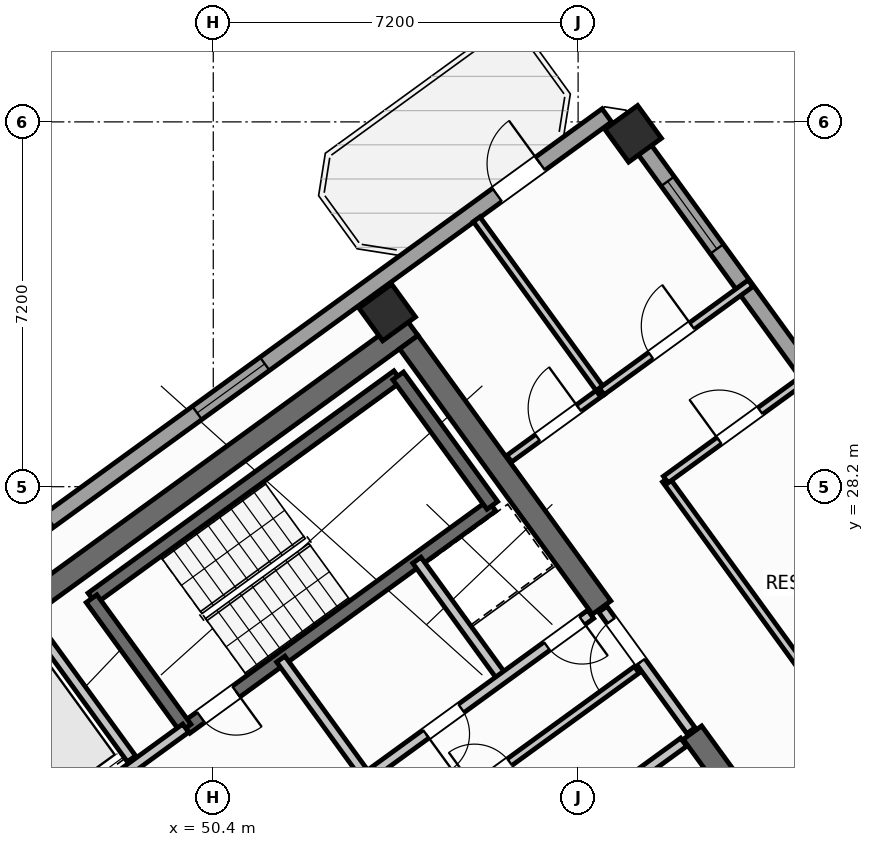
"""IFC4 building model, lengths in metres.
Left out: names, types, materials, properties, quantities, classifications, styles, units other than length and angle.
Written with IfcOpenShell. Run it as: python <this file> out.ifc"""

import sys

from ifc_helpers import new_model, si_unit, direction, frame, frame_2d, origin, origin_2d, place, context, subcontext, project, spatial, rectangle, hollow_rectangle, extrude, source, transform, mapped, element, fill, save


model = new_model("IFC4")
c1 = context("Model", 3, precision=1e-05, world=origin(), true_north=direction((0.0, 1.0)))
c2 = subcontext(c1, "Body", "Model", "MODEL_VIEW")
j1 = project(units=[si_unit("LENGTHUNIT", "METRE"), si_unit("PLANEANGLEUNIT", "RADIAN")], contexts=[c1])
p1 = place(None, origin())
s1 = spatial("IfcSite", under=j1, at=p1, CompositionType="ELEMENT")
p2 = place(p1, origin())
s2 = spatial("IfcBuilding", under=s1, at=p2, CompositionType="ELEMENT")
p3 = place(p2, frame((0.0, 0.0, 238.5)))
s3 = spatial("IfcBuildingStorey", under=s2, at=p3, CompositionType="ELEMENT", Elevation=238.5)
p4 = place(p3, frame((44.406, 24.172, 0.0), z_axis=(0.0, 0.0, 1.0), x_axis=(0.809012867805, 0.587790931986, 0.0)))
e1 = element("IfcWall", 1, at=p4, inside=s3, PredefinedType="SHEAR", context=c2, shape_type="SweptSolid", body=[
    extrude(rectangle(XDim=12.24, YDim=0.45, at=frame_2d((6.12, 0.0))), origin(), (0.0, 0.0, 1.0), 3.35),
])
p5 = place(p3, frame((48.526, 18.884, 0.0), z_axis=(0.0, 0.0, 1.0), x_axis=(-0.587774812919, 0.809024578921, 0.0)))
e2 = element("IfcWall", 2, at=p5, inside=s3, PredefinedType="SHEAR", context=c2, shape_type="SweptSolid", body=[
    extrude(rectangle(XDim=6.475, YDim=0.45, at=frame_2d((3.238, 0.0))), origin(), (0.0, 0.0, 1.0), 3.35),
])
p6 = place(p3, frame((61.988, 20.413, 0.0), z_axis=(0.0, 0.0, 1.0), x_axis=(-0.587819244441, 0.808992296542, 0.0)))
e3 = element("IfcWall", 3, at=p6, inside=s3, PredefinedType="SHEAR", context=c2, shape_type="SweptSolid", body=[
    extrude(rectangle(XDim=3.625, YDim=0.45, at=frame_2d((1.812, 0.0))), origin(), (0.0, 0.0, 1.0), 3.35),
])
p7 = place(p3, frame((58.064, 25.813, 0.0), z_axis=(0.0, 0.0, 1.0), x_axis=(-0.587774812919, 0.809024578921, 0.0)))
e4 = element("IfcWall", 4, at=p7, inside=s3, PredefinedType="SHEAR", context=c2, shape_type="SweptSolid", body=[
    extrude(rectangle(XDim=6.475, YDim=0.45, at=frame_2d((3.238, 0.0))), origin(), (0.0, 0.0, 1.0), 3.35),
])
m1 = source(origin(), c2, "Body", "SweptSolid", [
    extrude(hollow_rectangle(XDim=0.8, YDim=0.8, WallThickness=0.032, at=origin_2d()), origin(), (0.0, 0.0, 1.0), 3.6),
])
for number, where, z_axis, x_axis in (
    (5, (53.832, 31.638, 0.0), (0.0, 0.0, 1.0), (0.809, 0.588, 0.0)),
    (6, (58.686, 35.165, 0.0), (0.0, 0.0, 1.0), (0.809, 0.588, 0.0)),
):
    element("IfcColumn", number, at=place(p3, frame(where, z_axis=z_axis, x_axis=x_axis)), inside=s3, PredefinedType="COLUMN", context=c2, shape_type="MappedRepresentation", body=[
        mapped(m1, transform((0.0, 0.0, 0.0), scale=1.0)),
    ])
p8 = place(p3, frame((43.938, 25.192, 0.0), z_axis=(0.0, 0.0, 1.0), x_axis=(0.809016324578, 0.587786174187, 0.0)))
e7 = element("IfcWall", 7, at=p8, inside=s3, PredefinedType="STANDARD", context=c2, shape_type="SweptSolid", body=[
    extrude(rectangle(XDim=17.587, YDim=0.32, at=frame_2d((8.794, 0.0))), origin(), (0.0, 0.0, 1.0), 3.35),
])
p9 = place(p8, frame((14.914, 0.0, 0.0)))
e8 = element("IfcOpeningElement", 8, at=p9, cuts=e7, PredefinedType="OPENING", context=c2, shape_type="SweptSolid", body=[
    extrude(rectangle(XDim=1.05, YDim=2.15, at=frame_2d((0.525, 1.075))), frame((0.0, 0.17, 0.0), z_axis=(0.0, -1.0, 0.0), x_axis=(1.0, 0.0, 0.0)), (0.0, 0.0, 1.0), 0.34),
])
p10 = place(p8, frame((2.344, 0.0, 0.9)))
e9 = element("IfcOpeningElement", 9, at=p10, cuts=e7, PredefinedType="OPENING", context=c2, shape_type="SweptSolid", body=[
    extrude(rectangle(XDim=1.65, YDim=1.45, at=frame_2d((0.825, 0.725))), frame((0.0, 0.17, 0.0), z_axis=(0.0, -1.0, 0.0), x_axis=(1.0, 0.0, 0.0)), (0.0, 0.0, 1.0), 0.34),
])
p11 = place(p8, frame((7.594, 0.0, 0.9)))
e10 = element("IfcOpeningElement", 10, at=p11, cuts=e7, PredefinedType="OPENING", context=c2, shape_type="SweptSolid", body=[
    extrude(rectangle(XDim=1.65, YDim=1.45, at=frame_2d((0.825, 0.725))), frame((0.0, 0.17, 0.0), z_axis=(0.0, -1.0, 0.0), x_axis=(1.0, 0.0, 0.0)), (0.0, 0.0, 1.0), 0.34),
])
p12 = place(p3, frame((58.455, 35.484, 0.0), z_axis=(0.0, 0.0, 1.0), x_axis=(0.587783625747, -0.809018176127, 0.0)))
e11 = element("IfcWall", 11, at=p12, inside=s3, PredefinedType="STANDARD", context=c2, shape_type="SweptSolid", body=[
    extrude(rectangle(XDim=21.587, YDim=0.32, at=frame_2d((10.794, 0.0))), origin(), (0.0, 0.0, 1.0), 2.875),
])
p13 = place(p12, frame((1.554, 0.0, 0.9)))
e12 = element("IfcOpeningElement", 12, at=p13, cuts=e11, PredefinedType="OPENING", context=c2, shape_type="SweptSolid", body=[
    extrude(rectangle(XDim=1.65, YDim=1.45, at=frame_2d((0.825, 0.725))), frame((0.0, 0.17, 0.0), z_axis=(0.0, -1.0, 0.0), x_axis=(1.0, 0.0, 0.0)), (0.0, 0.0, 1.0), 0.34),
])
p14 = place(p12, frame((9.219, 0.0, 0.9)))
e13 = element("IfcOpeningElement", 13, at=p14, cuts=e11, PredefinedType="OPENING", context=c2, shape_type="SweptSolid", body=[
    extrude(rectangle(XDim=1.35, YDim=1.45, at=frame_2d((0.675, 0.725))), frame((0.0, 0.17, 0.0), z_axis=(0.0, -1.0, 0.0), x_axis=(1.0, 0.0, 0.0)), (0.0, 0.0, 1.0), 0.34),
])
p15 = place(p12, frame((12.119, 0.0, 0.9)))
e14 = element("IfcOpeningElement", 14, at=p15, cuts=e11, PredefinedType="OPENING", context=c2, shape_type="SweptSolid", body=[
    extrude(rectangle(XDim=1.35, YDim=1.45, at=frame_2d((0.675, 0.725))), frame((0.0, 0.17, 0.0), z_axis=(0.0, -1.0, 0.0), x_axis=(1.0, 0.0, 0.0)), (0.0, 0.0, 1.0), 0.34),
])
p16 = place(p12, frame((16.833, 0.0, 1.0)))
e15 = element("IfcOpeningElement", 15, at=p16, cuts=e11, PredefinedType="OPENING", context=c2, shape_type="SweptSolid", body=[
    extrude(rectangle(XDim=0.9, YDim=1.25, at=frame_2d((0.45, 0.625))), frame((0.0, 0.17, 0.0), z_axis=(0.0, -1.0, 0.0), x_axis=(1.0, 0.0, 0.0)), (0.0, 0.0, 1.0), 0.34),
])
p17 = place(p12, frame((19.057, 0.0, 1.0)))
e16 = element("IfcOpeningElement", 16, at=p17, cuts=e11, PredefinedType="OPENING", context=c2, shape_type="SweptSolid", body=[
    extrude(rectangle(XDim=0.9, YDim=1.25, at=frame_2d((0.45, 0.625))), frame((0.0, 0.17, 0.0), z_axis=(0.0, -1.0, 0.0), x_axis=(1.0, 0.0, 0.0)), (0.0, 0.0, 1.0), 0.34),
])
p18 = place(p3, frame((48.006, 25.996, 0.0), z_axis=(0.0, 0.0, 1.0), x_axis=(0.80901903764, 0.587782439969, 0.0)))
e17 = element("IfcWall", 17, at=p18, inside=s3, PredefinedType="SHEAR", context=c2, shape_type="SweptSolid", body=[
    extrude(rectangle(XDim=7.46, YDim=0.26, at=frame_2d((3.73, 0.0))), origin(), (0.0, 0.0, 1.0), 3.35),
])
p19 = place(p3, frame((49.863, 23.44, 0.0), z_axis=(0.0, 0.0, 1.0), x_axis=(0.809003474932, 0.587803859759, 0.0)))
e18 = element("IfcWall", 18, at=p19, inside=s3, PredefinedType="SHEAR", context=c2, shape_type="SweptSolid", body=[
    extrude(rectangle(XDim=7.46, YDim=0.26, at=frame_2d((3.73, 0.0))), origin(), (0.0, 0.0, 1.0), 3.35),
])
p20 = place(p19, frame((0.36, 0.0, 0.0)))
e19 = element("IfcOpeningElement", 19, at=p20, cuts=e18, PredefinedType="OPENING", context=c2, shape_type="SweptSolid", body=[
    extrude(rectangle(XDim=0.86, YDim=2.05, at=frame_2d((0.43, 1.025))), frame((0.0, 0.14, 0.0), z_axis=(0.0, -1.0, 0.0), x_axis=(1.0, 0.0, 0.0)), (0.0, 0.0, 1.0), 0.28),
])
p21 = place(p3, frame((49.855, 23.434, 0.0), z_axis=(0.0, 0.0, 1.0), x_axis=(-0.58776738483, 0.809029975545, 0.0)))
e20 = element("IfcWall", 20, at=p21, inside=s3, PredefinedType="SHEAR", context=c2, shape_type="SweptSolid", body=[
    extrude(rectangle(XDim=3.16, YDim=0.26, at=frame_2d((1.58, 0.0))), origin(), (0.0, 0.0, 1.0), 3.35),
])
p22 = place(p3, frame((55.906, 27.831, 0.0), z_axis=(0.0, 0.0, 1.0), x_axis=(-0.587804123638, 0.809003283204, 0.0)))
e21 = element("IfcWall", 21, at=p22, inside=s3, PredefinedType="SHEAR", context=c2, shape_type="SweptSolid", body=[
    extrude(rectangle(XDim=3.16, YDim=0.26, at=frame_2d((1.58, 0.0))), origin(), (0.0, 0.0, 1.0), 3.35),
])
p23 = place(p3, frame((47.025, 21.378, 0.0), z_axis=(0.0, 0.0, 1.0), x_axis=(0.809052869724, 0.587735870941, 0.0)))
e22 = element("IfcWall", 22, at=p23, inside=s3, PredefinedType="STANDARD", context=c2, shape_type="SweptSolid", body=[
    extrude(rectangle(XDim=3.498, YDim=0.2, at=frame_2d((1.749, 0.0))), origin(), (0.0, 0.0, 1.0), 3.34),
])
p24 = place(p23, frame((0.508, 0.0, 0.0)))
e23 = element("IfcOpeningElement", 23, at=p24, cuts=e22, PredefinedType="OPENING", context=c2, shape_type="SweptSolid", body=[
    extrude(rectangle(XDim=1.3, YDim=2.2, at=frame_2d((0.65, 1.1))), frame((0.0, 0.11, 0.0), z_axis=(0.0, -1.0, 0.0), x_axis=(1.0, 0.0, 0.0)), (0.0, 0.0, 1.0), 0.22),
])
p25 = place(p3, frame((56.553, 20.884, 0.0), z_axis=(0.0, 0.0, 1.0), x_axis=(0.809041669066, 0.587751288995, 0.0)))
e24 = element("IfcWall", 24, at=p25, inside=s3, PredefinedType="STANDARD", context=c2, shape_type="SweptSolid", body=[
    extrude(rectangle(XDim=3.868, YDim=0.2, at=frame_2d((1.934, 0.0))), origin(), (0.0, 0.0, 1.0), 3.34),
])
p26 = place(p25, frame((0.55, 0.0, 0.0)))
e25 = element("IfcOpeningElement", 25, at=p26, cuts=e24, PredefinedType="OPENING", context=c2, shape_type="SweptSolid", body=[
    extrude(rectangle(XDim=0.86, YDim=2.05, at=frame_2d((0.43, 1.025))), frame((0.0, 0.11, 0.0), z_axis=(0.0, -1.0, 0.0), x_axis=(1.0, 0.0, 0.0)), (0.0, 0.0, 1.0), 0.22),
])
p27 = place(p3, frame((54.421, 21.436, 0.0), z_axis=(0.0, 0.0, 1.0), x_axis=(0.809013710463, 0.587789772183, 0.0)))
e26 = element("IfcWall", 26, at=p27, inside=s3, PredefinedType="PARTITIONING", context=c2, shape_type="SweptSolid", body=[
    extrude(rectangle(XDim=5.36, YDim=0.16, at=frame_2d((2.68, 0.0))), origin(), (0.0, 0.0, 1.0), 3.34),
])
p28 = place(p27, frame((1.4, 0.0, 0.0)))
e27 = element("IfcOpeningElement", 27, at=p28, cuts=e26, PredefinedType="OPENING", context=c2, shape_type="SweptSolid", body=[
    extrude(rectangle(XDim=0.86, YDim=2.05, at=frame_2d((0.43, 1.025))), frame((0.0, 0.09, 0.0), z_axis=(0.0, -1.0, 0.0), x_axis=(1.0, 0.0, 0.0)), (0.0, 0.0, 1.0), 0.18),
])
p29 = place(p3, frame((48.786, 22.83, 0.0), z_axis=(0.0, 0.0, 1.0), x_axis=(-0.587783856777, 0.809018008275, 0.0)))
e28 = element("IfcWall", 28, at=p29, inside=s3, PredefinedType="STANDARD", context=c2, shape_type="SweptSolid", body=[
    extrude(rectangle(XDim=2.92, YDim=0.2, at=frame_2d((1.46, 0.0))), origin(), (0.0, 0.0, 1.0), 3.34),
])
p30 = place(p3, frame((53.425, 22.468, 0.0), z_axis=(0.0, 0.0, 1.0), x_axis=(-0.5877230039, 0.809062216821, 0.0)))
e29 = element("IfcWall", 29, at=p30, inside=s3, PredefinedType="STANDARD", context=c2, shape_type="SweptSolid", body=[
    extrude(rectangle(XDim=2.88, YDim=0.2, at=frame_2d((1.44, 0.0))), origin(), (0.0, 0.0, 1.0), 3.34),
])
p31 = place(p3, frame((56.111, 24.419, 0.0), z_axis=(0.0, 0.0, 1.0), x_axis=(-0.58777848983, 0.809021907548, 0.0)))
e30 = element("IfcWall", 30, at=p31, inside=s3, PredefinedType="STANDARD", context=c2, shape_type="SweptSolid", body=[
    extrude(rectangle(XDim=2.88, YDim=0.2, at=frame_2d((1.44, 0.0))), origin(), (0.0, 0.0, 1.0), 3.34),
])
p32 = place(p3, frame((53.425, 22.468, 0.0), z_axis=(0.0, 0.0, 1.0), x_axis=(0.809015945709, 0.587786695655, 0.0)))
e31 = element("IfcWall", 31, at=p32, inside=s3, PredefinedType="STANDARD", context=c2, shape_type="SweptSolid", body=[
    extrude(rectangle(XDim=5.468, YDim=0.2, at=frame_2d((2.734, 0.0))), origin(), (0.0, 0.0, 1.0), 3.34),
])
p33 = place(p32, frame((4.4, 0.0, 0.0)))
e32 = element("IfcOpeningElement", 32, at=p33, cuts=e31, PredefinedType="OPENING", context=c2, shape_type="SweptSolid", body=[
    extrude(rectangle(XDim=0.86, YDim=2.05, at=frame_2d((0.43, 1.025))), frame((0.0, 0.11, 0.0), z_axis=(0.0, -1.0, 0.0), x_axis=(1.0, 0.0, 0.0)), (0.0, 0.0, 1.0), 0.22),
])
p34 = place(p32, frame((1.45, 0.0, 0.0)))
e33 = element("IfcOpeningElement", 33, at=p34, cuts=e31, PredefinedType="OPENING", context=c2, shape_type="SweptSolid", body=[
    extrude(rectangle(XDim=0.86, YDim=2.05, at=frame_2d((0.43, 1.025))), frame((0.0, 0.11, 0.0), z_axis=(0.0, -1.0, 0.0), x_axis=(1.0, 0.0, 0.0)), (0.0, 0.0, 1.0), 0.22),
])
p35 = place(p3, frame((59.827, 23.386, 0.0), z_axis=(0.0, 0.0, 1.0), x_axis=(-0.587803840107, 0.809003489211, 0.0)))
e34 = element("IfcWall", 34, at=p35, inside=s3, PredefinedType="STANDARD", context=c2, shape_type="SweptSolid", body=[
    extrude(rectangle(XDim=2.96, YDim=0.2, at=frame_2d((1.48, 0.0))), origin(), (0.0, 0.0, 1.0), 3.34),
])
p36 = place(p35, frame((1.68, 0.0, 0.0)))
e35 = element("IfcOpeningElement", 35, at=p36, cuts=e34, PredefinedType="OPENING", context=c2, shape_type="SweptSolid", body=[
    extrude(rectangle(XDim=1.0, YDim=2.1, at=frame_2d((0.5, 1.05))), frame((0.0, 0.11, 0.0), z_axis=(0.0, -1.0, 0.0), x_axis=(1.0, 0.0, 0.0)), (0.0, 0.0, 1.0), 0.22),
])
p37 = place(p3, frame((56.24, 28.753, 0.0), z_axis=(0.0, 0.0, 1.0), x_axis=(0.809002482896, 0.587805225111, 0.0)))
e36 = element("IfcWall", 36, at=p37, inside=s3, PredefinedType="PARTITIONING", context=c2, shape_type="SweptSolid", body=[
    extrude(rectangle(XDim=2.258, YDim=0.16, at=frame_2d((1.129, 0.0))), origin(), (0.0, 0.0, 1.0), 3.34),
])
p38 = place(p37, frame((0.698, 0.0, 0.0)))
e37 = element("IfcOpeningElement", 37, at=p38, cuts=e36, PredefinedType="OPENING", context=c2, shape_type="SweptSolid", body=[
    extrude(rectangle(XDim=1.0, YDim=2.1, at=frame_2d((0.5, 1.05))), frame((0.0, 0.09, 0.0), z_axis=(0.0, -1.0, 0.0), x_axis=(1.0, 0.0, 0.0)), (0.0, 0.0, 1.0), 0.18),
])
p39 = place(p3, frame((68.353, 15.922, 0.0), z_axis=(0.0, 0.0, 1.0), x_axis=(-0.587782002009, 0.809019355834, 0.0)))
e38 = element("IfcWall", 38, at=p39, inside=s3, PredefinedType="PARTITIONING", context=c2, shape_type="SweptSolid", body=[
    extrude(rectangle(XDim=15.35, YDim=0.16, at=frame_2d((7.675, 0.0))), origin(), (0.0, 0.0, 1.0), 3.34),
])
p40 = place(p3, frame((58.067, 30.08, 0.0), z_axis=(0.0, 0.0, 1.0), x_axis=(-0.587812175236, 0.808997433027, 0.0)))
e39 = element("IfcWall", 39, at=p40, inside=s3, PredefinedType="PARTITIONING", context=c2, shape_type="SweptSolid", body=[
    extrude(rectangle(XDim=4.2, YDim=0.16, at=frame_2d((2.1, 0.0))), origin(), (0.0, 0.0, 1.0), 3.34),
])
p41 = place(p3, frame((59.331, 28.341, 0.0), z_axis=(0.0, 0.0, 1.0), x_axis=(0.809003564202, 0.587803736896, 0.0)))
e40 = element("IfcWall", 40, at=p41, inside=s3, PredefinedType="PARTITIONING", context=c2, shape_type="SweptSolid", body=[
    extrude(rectangle(XDim=3.63, YDim=0.16, at=frame_2d((1.815, 0.0))), origin(), (0.0, 0.0, 1.0), 3.34),
])
p42 = place(p41, frame((1.305, 0.0, 0.0)))
e41 = element("IfcOpeningElement", 41, at=p42, cuts=e40, PredefinedType="OPENING", context=c2, shape_type="SweptSolid", body=[
    extrude(rectangle(XDim=1.0, YDim=2.1, at=frame_2d((0.5, 1.05))), frame((0.0, 0.09, 0.0), z_axis=(0.0, -1.0, 0.0), x_axis=(1.0, 0.0, 0.0)), (0.0, 0.0, 1.0), 0.18),
])
p43 = place(p3, frame((58.067, 30.08, 0.0), z_axis=(0.0, 0.0, 1.0), x_axis=(0.809012309495, 0.587791700422, 0.0)))
e42 = element("IfcWall", 42, at=p43, inside=s3, PredefinedType="PARTITIONING", context=c2, shape_type="SweptSolid", body=[
    extrude(rectangle(XDim=3.63, YDim=0.16, at=frame_2d((1.815, 0.0))), origin(), (0.0, 0.0, 1.0), 3.34),
])
p44 = place(p43, frame((1.2, 0.0, 0.0)))
e43 = element("IfcOpeningElement", 43, at=p44, cuts=e42, PredefinedType="OPENING", context=c2, shape_type="SweptSolid", body=[
    extrude(rectangle(XDim=1.0, YDim=2.1, at=frame_2d((0.5, 1.05))), frame((0.0, 0.09, 0.0), z_axis=(0.0, -1.0, 0.0), x_axis=(1.0, 0.0, 0.0)), (0.0, 0.0, 1.0), 0.18),
])
m2 = source(origin(), c2, "Body", "SweptSolid", [
    extrude(rectangle(XDim=1.05, YDim=2.15, at=frame_2d((0.525, 1.075))), frame((0.0, 0.025, 0.0), z_axis=(0.0, -1.0, 0.0), x_axis=(1.0, 0.0, 0.0)), (0.0, 0.0, 1.0), 0.05),
])
p45 = place(p9, origin())
e44 = element("IfcDoor", 44, at=p45, inside=s3, OperationType="SINGLE_SWING_RIGHT", PredefinedType="DOOR", context=c2, shape_type="MappedRepresentation", body=[
    mapped(m2, transform((0.0, 0.0, 0.0), scale=1.0)),
])
fill(e8, e44)
m3 = source(origin(), c2, "Body", "SweptSolid", [
    extrude(rectangle(XDim=1.65, YDim=1.45, at=frame_2d((0.825, 0.725))), frame((0.0, 0.03, 0.0), z_axis=(0.0, -1.0, 0.0), x_axis=(1.0, 0.0, 0.0)), (0.0, 0.0, 1.0), 0.06),
])
p46 = place(p11, origin())
e45 = element("IfcWindow", 45, at=p46, inside=s3, PartitioningType="SINGLE_PANEL", PredefinedType="WINDOW", context=c2, shape_type="MappedRepresentation", body=[
    mapped(m3, transform((0.0, 0.0, 0.0), scale=1.0)),
])
fill(e10, e45)
p47 = place(p13, origin())
e46 = element("IfcWindow", 46, at=p47, inside=s3, PartitioningType="SINGLE_PANEL", PredefinedType="WINDOW", context=c2, shape_type="MappedRepresentation", body=[
    mapped(m3, transform((0.0, 0.0, 0.0), scale=1.0)),
])
fill(e12, e46)
m4 = source(origin(), c2, "Body", "SweptSolid", [
    extrude(rectangle(XDim=0.86, YDim=2.05, at=frame_2d((0.43, 1.025))), frame((0.0, 0.025, 0.0), z_axis=(0.0, -1.0, 0.0), x_axis=(1.0, 0.0, 0.0)), (0.0, 0.0, 1.0), 0.05),
])
p48 = place(p20, frame((0.86, 0.0, 0.0), z_axis=(0.0, 0.0, 1.0), x_axis=(-1.0, 0.0, 0.0)))
e47 = element("IfcDoor", 47, at=p48, inside=s3, OperationType="SINGLE_SWING_LEFT", PredefinedType="DOOR", context=c2, shape_type="MappedRepresentation", body=[
    mapped(m4, transform((0.0, 0.0, 0.0), scale=1.0)),
])
fill(e19, e47)
p49 = place(p28, origin())
e48 = element("IfcDoor", 48, at=p49, inside=s3, OperationType="SINGLE_SWING_LEFT", PredefinedType="DOOR", context=c2, shape_type="MappedRepresentation", body=[
    mapped(m4, transform((0.0, 0.0, 0.0), scale=1.0)),
])
fill(e27, e48)
p50 = place(p33, frame((0.86, 0.0, 0.0), z_axis=(0.0, 0.0, 1.0), x_axis=(-1.0, 0.0, 0.0)))
e49 = element("IfcDoor", 49, at=p50, inside=s3, OperationType="SINGLE_SWING_LEFT", PredefinedType="DOOR", context=c2, shape_type="MappedRepresentation", body=[
    mapped(m4, transform((0.0, 0.0, 0.0), scale=1.0)),
])
fill(e32, e49)
p51 = place(p34, frame((0.86, 0.0, 0.0), z_axis=(0.0, 0.0, 1.0), x_axis=(-1.0, 0.0, 0.0)))
e50 = element("IfcDoor", 50, at=p51, inside=s3, OperationType="SINGLE_SWING_RIGHT", PredefinedType="DOOR", context=c2, shape_type="MappedRepresentation", body=[
    mapped(m4, transform((0.0, 0.0, 0.0), scale=1.0)),
])
fill(e33, e50)
m5 = source(origin(), c2, "Body", "SweptSolid", [
    extrude(rectangle(XDim=1.0, YDim=2.1, at=frame_2d((0.5, 1.05))), frame((0.0, 0.025, 0.0), z_axis=(0.0, -1.0, 0.0), x_axis=(1.0, 0.0, 0.0)), (0.0, 0.0, 1.0), 0.05),
])
p52 = place(p38, origin())
e51 = element("IfcDoor", 51, at=p52, inside=s3, OperationType="SINGLE_SWING_RIGHT", PredefinedType="DOOR", context=c2, shape_type="MappedRepresentation", body=[
    mapped(m5, transform((0.0, 0.0, 0.0), scale=1.0)),
])
fill(e37, e51)
p53 = place(p36, origin())
e52 = element("IfcDoor", 52, at=p53, inside=s3, OperationType="SINGLE_SWING_LEFT", PredefinedType="DOOR", context=c2, shape_type="MappedRepresentation", body=[
    mapped(m5, transform((0.0, 0.0, 0.0), scale=1.0)),
])
fill(e35, e52)
p54 = place(p44, origin())
e53 = element("IfcDoor", 53, at=p54, inside=s3, OperationType="SINGLE_SWING_RIGHT", PredefinedType="DOOR", context=c2, shape_type="MappedRepresentation", body=[
    mapped(m5, transform((0.0, 0.0, 0.0), scale=1.0)),
])
fill(e43, e53)
p55 = place(p42, origin())
e54 = element("IfcDoor", 54, at=p55, inside=s3, OperationType="SINGLE_SWING_LEFT", PredefinedType="DOOR", context=c2, shape_type="MappedRepresentation", body=[
    mapped(m5, transform((0.0, 0.0, 0.0), scale=1.0)),
])
fill(e41, e54)
save(model, sys.argv[1])
